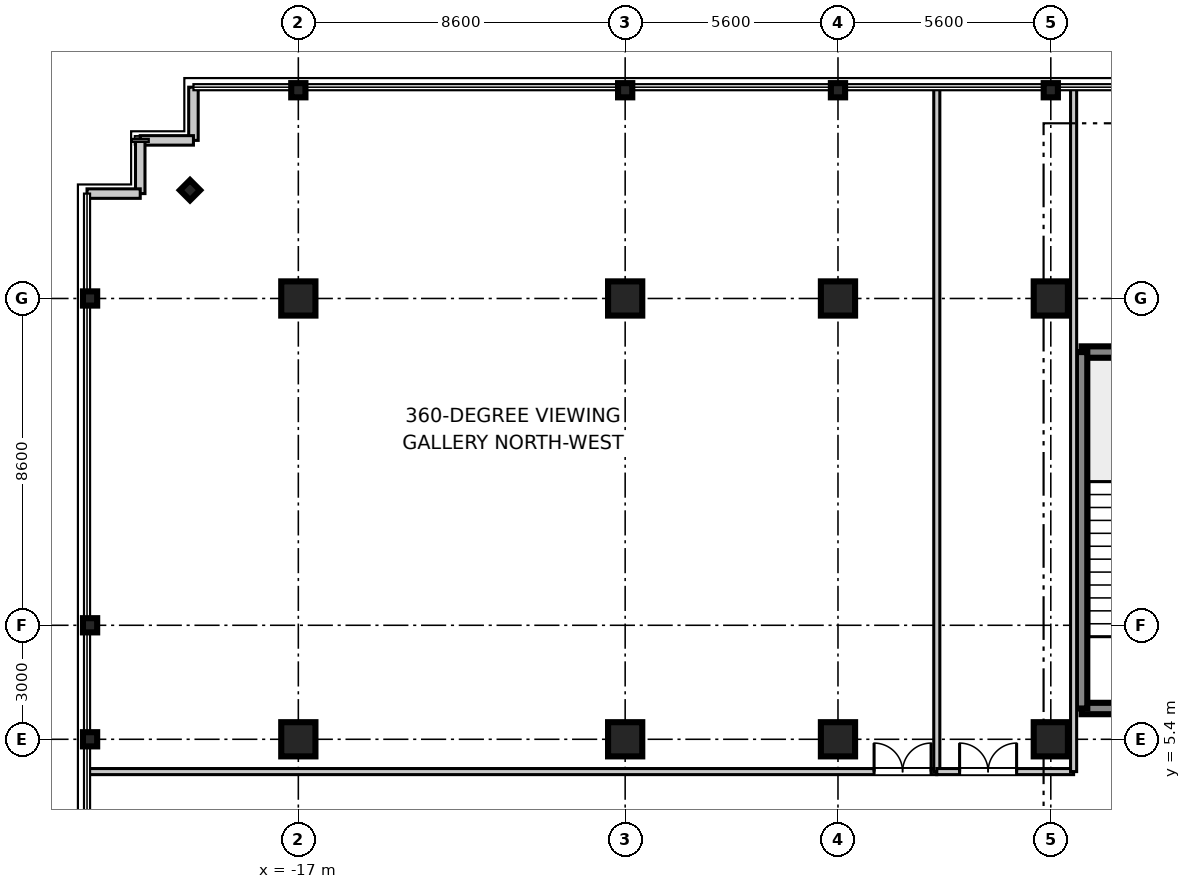
"""IFC4 building model, lengths in metres.
Left out: names, types, materials, properties, quantities, classifications, styles, units other than length and angle.
Written with IfcOpenShell. Run it as: python <this file> out.ifc"""

import sys

from ifc_helpers import new_model, si_unit, direction, frame, frame_2d, origin, origin_2d, place, context, subcontext, project, spatial, rectangle, i_section, extrude, source, transform, mapped, element, fill, save


model = new_model("IFC4")
c1 = context("Model", 3, precision=1e-05, world=origin(), true_north=direction((0.0, 1.0)))
c2 = subcontext(c1, "Body", "Model", "MODEL_VIEW")
j1 = project(units=[si_unit("LENGTHUNIT", "METRE"), si_unit("PLANEANGLEUNIT", "RADIAN")], contexts=[c1])
p1 = place(None, origin())
s1 = spatial("IfcSite", under=j1, at=p1, CompositionType="ELEMENT")
p2 = place(p1, origin())
s2 = spatial("IfcBuilding", under=s1, at=p2, CompositionType="ELEMENT")
p3 = place(p2, frame((0.0, 0.0, 343.05)))
s3 = spatial("IfcBuildingStorey", under=s2, at=p3, CompositionType="ELEMENT", Elevation=343.05)
m1 = source(origin(), c2, "Body", "SweptSolid", [
    extrude(rectangle(XDim=0.9, YDim=0.9, at=origin_2d()), origin(), (0.0, 0.0, 1.0), 4.455),
])
for number, where, z_axis, x_axis in (
    (1, (-17.0, 5.4, 0.0), (0.0, 0.0, 1.0), (1.0, 0.0, 0.0)),
    (2, (-17.0, 17.0, 0.0), (0.0, 0.0, 1.0), (1.0, 0.0, 0.0)),
    (3, (-8.4, 5.4, 0.0), (0.0, 0.0, 1.0), (1.0, 0.0, 0.0)),
    (4, (-8.4, 17.0, 0.0), (0.0, 0.0, 1.0), (1.0, 0.0, 0.0)),
    (5, (-2.8, 5.4, 0.0), (0.0, 0.0, 1.0), (1.0, 0.0, 0.0)),
    (6, (-2.8, 17.0, 0.0), (0.0, 0.0, 1.0), (1.0, 0.0, 0.0)),
    (7, (2.8, 5.4, 0.0), (0.0, 0.0, 1.0), (1.0, 0.0, 0.0)),
    (8, (2.8, 17.0, 0.0), (0.0, 0.0, 1.0), (1.0, 0.0, 0.0)),
):
    element("IfcColumn", number, at=place(p3, frame(where, z_axis=z_axis, x_axis=x_axis)), inside=s3, PredefinedType="COLUMN", context=c2, shape_type="MappedRepresentation", body=[
        mapped(m1, transform((0.0, 0.0, 0.0), scale=1.0)),
    ])
m2 = source(origin(), c2, "Body", "SweptSolid", [
    extrude(i_section(OverallWidth=0.374, OverallDepth=0.374, WebThickness=0.014, FlangeThickness=0.023, at=origin_2d()), origin(), (0.0, 0.0, 1.0), 4.455),
])
for number, where, z_axis, x_axis in (
    (9, (-22.48, 5.4, 0.0), (0.0, 0.0, 1.0), (1.0, 0.0, 0.0)),
    (10, (-22.48, 8.4, 0.0), (0.0, 0.0, 1.0), (1.0, 0.0, 0.0)),
    (11, (-22.48, 17.0, 0.0), (0.0, 0.0, 1.0), (1.0, 0.0, 0.0)),
    (12, (-17.0, 22.48, 0.0), (0.0, 0.0, 1.0), (0.0, 1.0, 0.0)),
    (13, (-8.4, 22.48, 0.0), (0.0, 0.0, 1.0), (0.0, 1.0, 0.0)),
    (14, (-2.8, 22.48, 0.0), (0.0, 0.0, 1.0), (0.0, 1.0, 0.0)),
    (15, (2.8, 22.48, 0.0), (0.0, 0.0, 1.0), (0.0, 1.0, 0.0)),
    (16, (-19.85, 19.85, 0.0), (0.0, 0.0, 1.0), (0.707, 0.707, 0.0)),
):
    element("IfcColumn", number, at=place(p3, frame(where, z_axis=z_axis, x_axis=x_axis)), inside=s3, PredefinedType="COLUMN", context=c2, shape_type="MappedRepresentation", body=[
        mapped(m2, transform((0.0, 0.0, 0.0), scale=1.0)),
    ])
m3 = source(origin(), c2, "Body", "SweptSolid", [
    extrude(rectangle(XDim=3.98, YDim=0.3, at=frame_2d((1.99, 0.0))), origin(), (0.0, 0.0, 1.0), 4.17),
])
for number, where, z_axis, x_axis in (
    (17, (3.61, 6.21, 0.0), (0.0, 0.0, 1.0), (1.0, 0.0, 0.0)),
    (18, (3.61, 15.59, 0.0), (0.0, 0.0, 1.0), (1.0, 0.0, 0.0)),
):
    element("IfcWall", number, at=place(p3, frame(where, z_axis=z_axis, x_axis=x_axis)), inside=s3, PredefinedType="SHEAR", context=c2, shape_type="MappedRepresentation", body=[
        mapped(m3, transform((0.0, 0.0, 0.0), scale=1.0)),
    ])
m4 = source(origin(), c2, "Body", "SweptSolid", [
    extrude(rectangle(XDim=9.38, YDim=0.3, at=frame_2d((4.69, 0.0))), origin(), (0.0, 0.0, 1.0), 4.17),
])
p4 = place(p3, frame((3.61, 6.21, 0.0), z_axis=(0.0, 0.0, 1.0), x_axis=(0.0, 1.0, 0.0)))
e19 = element("IfcWall", 19, at=p4, inside=s3, PredefinedType="SHEAR", context=c2, shape_type="MappedRepresentation", body=[
    mapped(m4, transform((0.0, 0.0, 0.0), scale=1.0)),
])
m5 = source(origin(), c2, "Body", "SweptSolid", [
    extrude(rectangle(XDim=1.4, YDim=0.25, at=frame_2d((0.7, 0.0))), origin(), (0.0, 0.0, 1.0), 4.17),
])
p5 = place(p3, frame((-19.76, 21.16, 0.0), z_axis=(0.0, 0.0, 1.0), x_axis=(0.0, 1.0, 0.0)))
e20 = element("IfcWall", 20, at=p5, inside=s3, PredefinedType="STANDARD", context=c2, shape_type="MappedRepresentation", body=[
    mapped(m5, transform((0.0, 0.0, 0.0), scale=1.0)),
])
m6 = source(origin(), c2, "Body", "SweptSolid", [
    extrude(rectangle(XDim=1.4, YDim=0.25, at=frame_2d((0.7, 0.0))), origin(), (0.0, 0.0, 1.0), 4.17),
])
for number, where, z_axis, x_axis in (
    (21, (-21.16, 21.16, 0.0), (0.0, 0.0, 1.0), (1.0, 0.0, 0.0)),
    (22, (-21.16, 19.76, 0.0), (0.0, 0.0, 1.0), (0.0, 1.0, 0.0)),
):
    element("IfcWall", number, at=place(p3, frame(where, z_axis=z_axis, x_axis=x_axis)), inside=s3, PredefinedType="STANDARD", context=c2, shape_type="MappedRepresentation", body=[
        mapped(m6, transform((0.0, 0.0, 0.0), scale=1.0)),
    ])
p6 = place(p3, frame((-22.56, 19.76, 0.0), z_axis=(0.0, 0.0, 1.0), x_axis=(1.0, 0.0, 0.0)))
e23 = element("IfcWall", 23, at=p6, inside=s3, PredefinedType="STANDARD", context=c2, shape_type="MappedRepresentation", body=[
    mapped(m5, transform((0.0, 0.0, 0.0), scale=1.0)),
])
m7 = source(origin(), c2, "Body", "SweptSolid", [
    extrude(rectangle(XDim=22.3, YDim=0.16, at=frame_2d((11.15, 0.0))), origin(), (0.0, 0.0, 1.0), 3.4),
])
p7 = place(p3, frame((-22.5, 4.55, 0.0), z_axis=(0.0, 0.0, 1.0), x_axis=(1.0, 0.0, 0.0)))
e24 = element("IfcWall", 24, at=p7, inside=s3, PredefinedType="PARTITIONING", context=c2, shape_type="MappedRepresentation", body=[
    mapped(m7, transform((0.0, 0.0, 0.0), scale=1.0)),
])
p8 = place(p7, frame((20.65, 0.0, 0.0)))
e25 = element("IfcOpeningElement", 25, at=p8, cuts=e24, PredefinedType="OPENING", context=c2, shape_type="SweptSolid", body=[
    extrude(rectangle(XDim=1.5, YDim=2.15, at=frame_2d((0.75, 1.075))), frame((0.0, 0.09, 0.0), z_axis=(0.0, -1.0, 0.0), x_axis=(1.0, 0.0, 0.0)), (0.0, 0.0, 1.0), 0.18),
])
m8 = source(origin(), c2, "Body", "SweptSolid", [
    extrude(rectangle(XDim=17.95, YDim=0.16, at=frame_2d((8.975, 0.0))), origin(), (0.0, 0.0, 1.0), 3.4),
])
p9 = place(p3, frame((-0.2, 4.55, 0.0), z_axis=(0.0, 0.0, 1.0), x_axis=(0.0, 1.0, 0.0)))
e26 = element("IfcWall", 26, at=p9, inside=s3, PredefinedType="PARTITIONING", context=c2, shape_type="MappedRepresentation", body=[
    mapped(m8, transform((0.0, 0.0, 0.0), scale=1.0)),
])
m9 = source(origin(), c2, "Body", "SweptSolid", [
    extrude(rectangle(XDim=3.6, YDim=0.16, at=frame_2d((1.8, 0.0))), origin(), (0.0, 0.0, 1.0), 3.4),
])
p10 = place(p3, frame((-0.2, 4.55, 0.0), z_axis=(0.0, 0.0, 1.0), x_axis=(1.0, 0.0, 0.0)))
e27 = element("IfcWall", 27, at=p10, inside=s3, PredefinedType="PARTITIONING", context=c2, shape_type="MappedRepresentation", body=[
    mapped(m9, transform((0.0, 0.0, 0.0), scale=1.0)),
])
p11 = place(p10, frame((0.6, 0.0, 0.0)))
e28 = element("IfcOpeningElement", 28, at=p11, cuts=e27, PredefinedType="OPENING", context=c2, shape_type="SweptSolid", body=[
    extrude(rectangle(XDim=1.5, YDim=2.15, at=frame_2d((0.75, 1.075))), frame((0.0, 0.09, 0.0), z_axis=(0.0, -1.0, 0.0), x_axis=(1.0, 0.0, 0.0)), (0.0, 0.0, 1.0), 0.18),
])
p12 = place(p3, frame((3.4, 4.55, 0.0), z_axis=(0.0, 0.0, 1.0), x_axis=(0.0, 1.0, 0.0)))
e29 = element("IfcWall", 29, at=p12, inside=s3, PredefinedType="PARTITIONING", context=c2, shape_type="MappedRepresentation", body=[
    mapped(m8, transform((0.0, 0.0, 0.0), scale=1.0)),
])
m10 = source(origin(), c2, "Body", "SweptSolid", [
    extrude(rectangle(XDim=1.5, YDim=2.15, at=frame_2d((0.75, 1.075))), frame((0.0, 0.025, 0.0), z_axis=(0.0, -1.0, 0.0), x_axis=(1.0, 0.0, 0.0)), (0.0, 0.0, 1.0), 0.05),
])
p13 = place(p8, origin())
e30 = element("IfcDoor", 30, at=p13, inside=s3, OperationType="DOUBLE_DOOR_SINGLE_SWING", PredefinedType="DOOR", context=c2, shape_type="MappedRepresentation", body=[
    mapped(m10, transform((0.0, 0.0, 0.0), scale=1.0)),
])
fill(e25, e30)
p14 = place(p11, origin())
e31 = element("IfcDoor", 31, at=p14, inside=s3, OperationType="DOUBLE_DOOR_SINGLE_SWING", PredefinedType="DOOR", context=c2, shape_type="MappedRepresentation", body=[
    mapped(m10, transform((0.0, 0.0, 0.0), scale=1.0)),
])
fill(e28, e31)
save(model, sys.argv[1])
